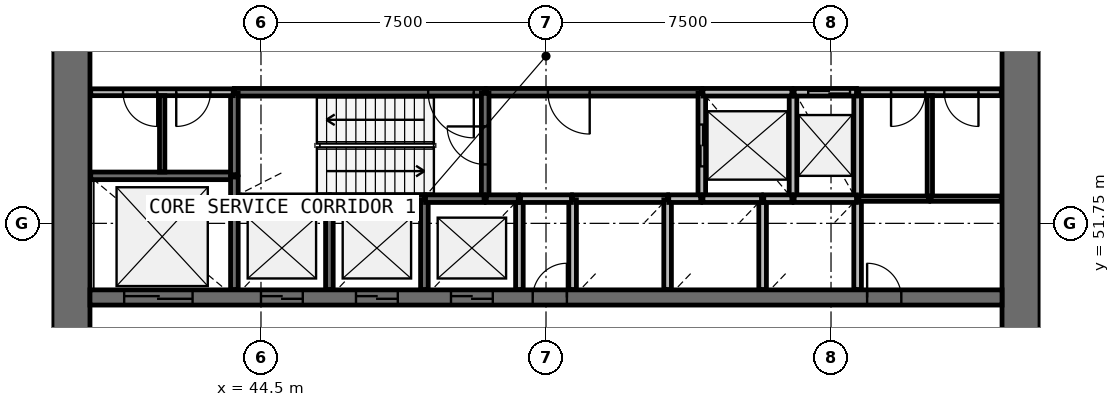
"""IFC4 building model, lengths in metres.
Left out: names, types, materials, properties, quantities, classifications, styles, units other than length and angle.
Written with IfcOpenShell. Run it as: python <this file> out.ifc"""

import sys

from ifc_helpers import new_model, si_unit, direction, frame, frame_2d, origin, place, context, subcontext, project, spatial, rectangle, extrude, source, transform, mapped, element, fill, save


model = new_model("IFC4")
c1 = context("Model", 3, precision=1e-05, world=origin(), true_north=direction((0.0, 1.0)))
c2 = subcontext(c1, "Body", "Model", "MODEL_VIEW")
j1 = project(units=[si_unit("LENGTHUNIT", "METRE"), si_unit("PLANEANGLEUNIT", "RADIAN")], contexts=[c1])
p1 = place(None, origin())
s1 = spatial("IfcSite", under=j1, at=p1, CompositionType="ELEMENT")
p2 = place(p1, origin())
s2 = spatial("IfcBuilding", under=s1, at=p2, CompositionType="ELEMENT")
p3 = place(p2, frame((0.0, 0.0, 71.0)))
s3 = spatial("IfcBuildingStorey", under=s2, at=p3, CompositionType="ELEMENT", Elevation=71.0)
p4 = place(p3, frame((64.5, 38.0, 0.0), z_axis=(0.0, 0.0, 1.0), x_axis=(0.0, 1.0, 0.0)))
e1 = element("IfcWall", 1, at=p4, inside=s3, PredefinedType="SHEAR", context=c2, shape_type="SweptSolid", body=[
    extrude(rectangle(XDim=20.0, YDim=1.0, at=frame_2d((10.0, 0.0))), origin(), (0.0, 0.0, 1.0), 4.4),
])
p5 = place(p4, frame((9.1, 0.0, 0.0)))
e2 = element("IfcOpeningElement", 2, at=p5, cuts=e1, PredefinedType="OPENING", context=c2, shape_type="SweptSolid", body=[
    extrude(rectangle(XDim=1.8, YDim=2.1, at=frame_2d((0.9, 1.05))), frame((0.0, 0.51, 0.0), z_axis=(0.0, -1.0, 0.0), x_axis=(1.0, 0.0, 0.0)), (0.0, 0.0, 1.0), 1.02),
])
p6 = place(p3, frame((39.5, 58.0, 0.0), z_axis=(0.0, 0.0, 1.0), x_axis=(0.0, -1.0, 0.0)))
e3 = element("IfcWall", 3, at=p6, inside=s3, PredefinedType="SHEAR", context=c2, shape_type="SweptSolid", body=[
    extrude(rectangle(XDim=20.0, YDim=1.0, at=frame_2d((10.0, 0.0))), origin(), (0.0, 0.0, 1.0), 4.4),
])
p7 = place(p6, frame((9.1, 0.0, 0.0)))
e4 = element("IfcOpeningElement", 4, at=p7, cuts=e3, PredefinedType="OPENING", context=c2, shape_type="SweptSolid", body=[
    extrude(rectangle(XDim=1.8, YDim=2.1, at=frame_2d((0.9, 1.05))), frame((0.0, 0.51, 0.0), z_axis=(0.0, -1.0, 0.0), x_axis=(1.0, 0.0, 0.0)), (0.0, 0.0, 1.0), 1.02),
])
p8 = place(p3, frame((40.0, 49.8, 0.0), z_axis=(0.0, 0.0, 1.0), x_axis=(1.0, 0.0, 0.0)))
e5 = element("IfcWall", 5, at=p8, inside=s3, PredefinedType="SHEAR", context=c2, shape_type="SweptSolid", body=[
    extrude(rectangle(XDim=24.0, YDim=0.4, at=frame_2d((12.0, 0.0))), origin(), (0.0, 0.0, 1.0), 4.4),
])
p9 = place(p8, frame((4.5, 0.0, 0.0)))
e6 = element("IfcOpeningElement", 6, at=p9, cuts=e5, PredefinedType="OPENING", context=c2, shape_type="SweptSolid", body=[
    extrude(rectangle(XDim=1.1, YDim=2.1, at=frame_2d((0.55, 1.05))), frame((0.0, 0.21, 0.0), z_axis=(0.0, -1.0, 0.0), x_axis=(1.0, 0.0, 0.0)), (0.0, 0.0, 1.0), 0.42),
])
p10 = place(p8, frame((7.0, 0.0, 0.0)))
e7 = element("IfcOpeningElement", 7, at=p10, cuts=e5, PredefinedType="OPENING", context=c2, shape_type="SweptSolid", body=[
    extrude(rectangle(XDim=1.1, YDim=2.1, at=frame_2d((0.55, 1.05))), frame((0.0, 0.21, 0.0), z_axis=(0.0, -1.0, 0.0), x_axis=(1.0, 0.0, 0.0)), (0.0, 0.0, 1.0), 0.42),
])
p11 = place(p8, frame((9.5, 0.0, 0.0)))
e8 = element("IfcOpeningElement", 8, at=p11, cuts=e5, PredefinedType="OPENING", context=c2, shape_type="SweptSolid", body=[
    extrude(rectangle(XDim=1.1, YDim=2.1, at=frame_2d((0.55, 1.05))), frame((0.0, 0.21, 0.0), z_axis=(0.0, -1.0, 0.0), x_axis=(1.0, 0.0, 0.0)), (0.0, 0.0, 1.0), 0.42),
])
p12 = place(p8, frame((0.9, 0.0, 0.0)))
e9 = element("IfcOpeningElement", 9, at=p12, cuts=e5, PredefinedType="OPENING", context=c2, shape_type="SweptSolid", body=[
    extrude(rectangle(XDim=1.8, YDim=2.4, at=frame_2d((0.9, 1.2))), frame((0.0, 0.21, 0.0), z_axis=(0.0, -1.0, 0.0), x_axis=(1.0, 0.0, 0.0)), (0.0, 0.0, 1.0), 0.42),
])
p13 = place(p8, frame((20.45, 0.0, 0.0)))
e10 = element("IfcOpeningElement", 10, at=p13, cuts=e5, PredefinedType="OPENING", context=c2, shape_type="SweptSolid", body=[
    extrude(rectangle(XDim=0.9, YDim=2.1, at=frame_2d((0.45, 1.05))), frame((0.0, 0.21, 0.0), z_axis=(0.0, -1.0, 0.0), x_axis=(1.0, 0.0, 0.0)), (0.0, 0.0, 1.0), 0.42),
])
p14 = place(p8, frame((11.65, 0.0, 0.0)))
e11 = element("IfcOpeningElement", 11, at=p14, cuts=e5, PredefinedType="OPENING", context=c2, shape_type="SweptSolid", body=[
    extrude(rectangle(XDim=0.9, YDim=2.1, at=frame_2d((0.45, 1.05))), frame((0.0, 0.21, 0.0), z_axis=(0.0, -1.0, 0.0), x_axis=(1.0, 0.0, 0.0)), (0.0, 0.0, 1.0), 0.42),
])
p15 = place(p3, frame((50.4, 55.2, 0.0), z_axis=(0.0, 0.0, 1.0), x_axis=(-1.0, 0.0, 0.0)))
e12 = element("IfcWall", 12, at=p15, inside=s3, PredefinedType="SOLIDWALL", context=c2, shape_type="SweptSolid", body=[
    extrude(rectangle(XDim=6.6, YDim=0.2, at=frame_2d((3.3, 0.0))), origin(), (0.0, 0.0, 1.0), 3.9),
])
p16 = place(p15, frame((0.3, 0.0, 0.0)))
e13 = element("IfcOpeningElement", 13, at=p16, cuts=e12, PredefinedType="OPENING", context=c2, shape_type="SweptSolid", body=[
    extrude(rectangle(XDim=1.2, YDim=2.1, at=frame_2d((0.6, 1.05))), frame((0.0, 0.11, 0.0), z_axis=(0.0, -1.0, 0.0), x_axis=(1.0, 0.0, 0.0)), (0.0, 0.0, 1.0), 0.22),
])
p17 = place(p3, frame((56.1, 55.2, 0.0), z_axis=(0.0, 0.0, 1.0), x_axis=(-1.0, 0.0, 0.0)))
e14 = element("IfcWall", 14, at=p17, inside=s3, PredefinedType="SOLIDWALL", context=c2, shape_type="SweptSolid", body=[
    extrude(rectangle(XDim=5.67, YDim=0.2, at=frame_2d((2.835, 0.0))), origin(), (0.0, 0.0, 1.0), 3.9),
])
p18 = place(p17, frame((2.95, 0.0, 0.0)))
e15 = element("IfcOpeningElement", 15, at=p18, cuts=e14, PredefinedType="OPENING", context=c2, shape_type="SweptSolid", body=[
    extrude(rectangle(XDim=1.1, YDim=2.1, at=frame_2d((0.55, 1.05))), frame((0.0, 0.11, 0.0), z_axis=(0.0, -1.0, 0.0), x_axis=(1.0, 0.0, 0.0)), (0.0, 0.0, 1.0), 0.22),
])
p19 = place(p3, frame((43.8, 53.0, 0.0), z_axis=(0.0, 0.0, 1.0), x_axis=(-1.0, 0.0, 0.0)))
e16 = element("IfcWall", 16, at=p19, inside=s3, PredefinedType="SOLIDWALL", context=c2, shape_type="SweptSolid", body=[
    extrude(rectangle(XDim=3.78, YDim=0.2, at=frame_2d((1.89, 0.0))), origin(), (0.0, 0.0, 1.0), 3.9),
])
p20 = place(p3, frame((50.4, 52.4, 0.0), z_axis=(0.0, 0.0, 1.0), x_axis=(0.0, 1.0, 0.0)))
e17 = element("IfcWall", 17, at=p20, inside=s3, PredefinedType="SOLIDWALL", context=c2, shape_type="SweptSolid", body=[
    extrude(rectangle(XDim=2.77, YDim=0.2, at=frame_2d((1.385, 0.0))), origin(), (0.0, 0.0, 1.0), 3.9),
])
p21 = place(p20, frame((0.9, 0.0, 0.0)))
e18 = element("IfcOpeningElement", 18, at=p21, cuts=e17, PredefinedType="OPENING", context=c2, shape_type="SweptSolid", body=[
    extrude(rectangle(XDim=1.0, YDim=2.1, at=frame_2d((0.5, 1.05))), frame((0.0, 0.11, 0.0), z_axis=(0.0, -1.0, 0.0), x_axis=(1.0, 0.0, 0.0)), (0.0, 0.0, 1.0), 0.22),
])
p22 = place(p3, frame((56.1, 55.17, 0.0), z_axis=(0.0, 0.0, 1.0), x_axis=(0.0, -1.0, 0.0)))
e19 = element("IfcWall", 19, at=p22, inside=s3, PredefinedType="SOLIDWALL", context=c2, shape_type="SweptSolid", body=[
    extrude(rectangle(XDim=2.77, YDim=0.2, at=frame_2d((1.385, 0.0))), origin(), (0.0, 0.0, 1.0), 3.9),
])
p23 = place(p22, frame((0.82, 0.0, 0.0)))
e20 = element("IfcOpeningElement", 20, at=p23, cuts=e19, PredefinedType="OPENING", context=c2, shape_type="SweptSolid", body=[
    extrude(rectangle(XDim=1.1, YDim=2.1, at=frame_2d((0.55, 1.05))), frame((0.0, 0.11, 0.0), z_axis=(0.0, -1.0, 0.0), x_axis=(1.0, 0.0, 0.0)), (0.0, 0.0, 1.0), 0.22),
])
for number, where, z_axis, x_axis in (
    (21, (58.5, 52.4, 0.0), (0.0, 0.0, 1.0), (0.0, 1.0, 0.0)),
    (22, (60.2, 52.4, 0.0), (0.0, 0.0, 1.0), (0.0, 1.0, 0.0)),
):
    element("IfcWall", number, at=place(p3, frame(where, z_axis=z_axis, x_axis=x_axis)), inside=s3, PredefinedType="SOLIDWALL", context=c2, shape_type="SweptSolid", body=[
        extrude(rectangle(XDim=2.8, YDim=0.2, at=frame_2d((1.4, 0.0))), origin(), (0.0, 0.0, 1.0), 3.9),
    ])
p24 = place(p3, frame((46.3, 52.4, 0.0), z_axis=(0.0, 0.0, 1.0), x_axis=(-1.0, 0.0, 0.0)))
e23 = element("IfcWall", 23, at=p24, inside=s3, PredefinedType="SOLIDWALL", context=c2, shape_type="SweptSolid", body=[
    extrude(rectangle(XDim=2.5, YDim=0.2, at=frame_2d((1.25, 0.0))), origin(), (0.0, 0.0, 1.0), 3.9),
])
p25 = place(p3, frame((48.8, 52.4, 0.0), z_axis=(0.0, 0.0, 1.0), x_axis=(-1.0, 0.0, 0.0)))
e24 = element("IfcWall", 24, at=p25, inside=s3, PredefinedType="SOLIDWALL", context=c2, shape_type="SweptSolid", body=[
    extrude(rectangle(XDim=2.47, YDim=0.2, at=frame_2d((1.235, 0.0))), origin(), (0.0, 0.0, 1.0), 3.9),
])
p26 = place(p3, frame((55.2, 52.4, 0.0), z_axis=(0.0, 0.0, 1.0), x_axis=(-1.0, 0.0, 0.0)))
e25 = element("IfcWall", 25, at=p26, inside=s3, PredefinedType="SOLIDWALL", context=c2, shape_type="SweptSolid", body=[
    extrude(rectangle(XDim=2.5, YDim=0.2, at=frame_2d((1.25, 0.0))), origin(), (0.0, 0.0, 1.0), 3.9),
])
p27 = place(p3, frame((58.47, 55.2, 0.0), z_axis=(0.0, 0.0, 1.0), x_axis=(-1.0, 0.0, 0.0)))
e26 = element("IfcWall", 26, at=p27, inside=s3, PredefinedType="SOLIDWALL", context=c2, shape_type="SweptSolid", body=[
    extrude(rectangle(XDim=2.34, YDim=0.2, at=frame_2d((1.17, 0.0))), origin(), (0.0, 0.0, 1.0), 3.9),
])
for number, where, z_axis, x_axis in (
    (27, (43.8, 52.37, 0.0), (0.0, 0.0, 1.0), (0.0, -1.0, 0.0)),
    (28, (46.3, 50.01, 0.0), (0.0, 0.0, 1.0), (0.0, 1.0, 0.0)),
    (29, (48.8, 50.01, 0.0), (0.0, 0.0, 1.0), (0.0, 1.0, 0.0)),
):
    element("IfcWall", number, at=place(p3, frame(where, z_axis=z_axis, x_axis=x_axis)), inside=s3, PredefinedType="SOLIDWALL", context=c2, shape_type="SweptSolid", body=[
        extrude(rectangle(XDim=2.36, YDim=0.2, at=frame_2d((1.18, 0.0))), origin(), (0.0, 0.0, 1.0), 3.9),
    ])
p28 = place(p3, frame((51.3, 50.01, 0.0), z_axis=(0.0, 0.0, 1.0), x_axis=(0.0, 1.0, 0.0)))
e30 = element("IfcWall", 30, at=p28, inside=s3, PredefinedType="SOLIDWALL", context=c2, shape_type="SweptSolid", body=[
    extrude(rectangle(XDim=2.39, YDim=0.2, at=frame_2d((1.195, 0.0))), origin(), (0.0, 0.0, 1.0), 3.9),
])
for number, where, z_axis, x_axis in (
    (31, (52.7, 52.37, 0.0), (0.0, 0.0, 1.0), (0.0, -1.0, 0.0)),
    (32, (55.2, 50.01, 0.0), (0.0, 0.0, 1.0), (0.0, 1.0, 0.0)),
):
    element("IfcWall", number, at=place(p3, frame(where, z_axis=z_axis, x_axis=x_axis)), inside=s3, PredefinedType="SOLIDWALL", context=c2, shape_type="SweptSolid", body=[
        extrude(rectangle(XDim=2.36, YDim=0.2, at=frame_2d((1.18, 0.0))), origin(), (0.0, 0.0, 1.0), 3.9),
    ])
p29 = place(p3, frame((57.7, 50.01, 0.0), z_axis=(0.0, 0.0, 1.0), x_axis=(0.0, 1.0, 0.0)))
e33 = element("IfcWall", 33, at=p29, inside=s3, PredefinedType="SOLIDWALL", context=c2, shape_type="SweptSolid", body=[
    extrude(rectangle(XDim=2.39, YDim=0.2, at=frame_2d((1.195, 0.0))), origin(), (0.0, 0.0, 1.0), 3.9),
])
p30 = place(p3, frame((60.2, 50.01, 0.0), z_axis=(0.0, 0.0, 1.0), x_axis=(0.0, 1.0, 0.0)))
e34 = element("IfcWall", 34, at=p30, inside=s3, PredefinedType="SOLIDWALL", context=c2, shape_type="SweptSolid", body=[
    extrude(rectangle(XDim=2.36, YDim=0.2, at=frame_2d((1.18, 0.0))), origin(), (0.0, 0.0, 1.0), 3.9),
])
p31 = place(p3, frame((43.8, 55.17, 0.0), z_axis=(0.0, 0.0, 1.0), x_axis=(0.0, -1.0, 0.0)))
e35 = element("IfcWall", 35, at=p31, inside=s3, PredefinedType="SOLIDWALL", context=c2, shape_type="SweptSolid", body=[
    extrude(rectangle(XDim=2.14, YDim=0.2, at=frame_2d((1.07, 0.0))), origin(), (0.0, 0.0, 1.0), 3.9),
])
p32 = place(p3, frame((60.17, 52.4, 0.0), z_axis=(0.0, 0.0, 1.0), x_axis=(-1.0, 0.0, 0.0)))
e36 = element("IfcWall", 36, at=p32, inside=s3, PredefinedType="SOLIDWALL", context=c2, shape_type="SweptSolid", body=[
    extrude(rectangle(XDim=1.64, YDim=0.2, at=frame_2d((0.82, 0.0))), origin(), (0.0, 0.0, 1.0), 3.9),
])
p33 = place(p3, frame((60.17, 55.2, 0.0), z_axis=(0.0, 0.0, 1.0), x_axis=(-1.0, 0.0, 0.0)))
e37 = element("IfcWall", 37, at=p33, inside=s3, PredefinedType="SOLIDWALL", context=c2, shape_type="SweptSolid", body=[
    extrude(rectangle(XDim=1.64, YDim=0.2, at=frame_2d((0.82, 0.0))), origin(), (0.0, 0.0, 1.0), 3.9),
])
p34 = place(p33, frame((0.17, 0.0, 0.0)))
e38 = element("IfcOpeningElement", 38, at=p34, cuts=e37, PredefinedType="OPENING", context=c2, shape_type="SweptSolid", body=[
    extrude(rectangle(XDim=1.1, YDim=2.1, at=frame_2d((0.55, 1.05))), frame((0.0, 0.11, 0.0), z_axis=(0.0, -1.0, 0.0), x_axis=(1.0, 0.0, 0.0)), (0.0, 0.0, 1.0), 0.22),
])
for number, where, z_axis, x_axis in (
    (39, (50.37, 52.4, 0.0), (0.0, 0.0, 1.0), (-1.0, 0.0, 0.0)),
    (40, (57.67, 52.4, 0.0), (0.0, 0.0, 1.0), (-1.0, 0.0, 0.0)),
):
    element("IfcWall", number, at=place(p3, frame(where, z_axis=z_axis, x_axis=x_axis)), inside=s3, PredefinedType="SOLIDWALL", context=c2, shape_type="SweptSolid", body=[
        extrude(rectangle(XDim=1.54, YDim=0.2, at=frame_2d((0.77, 0.0))), origin(), (0.0, 0.0, 1.0), 3.9),
    ])
p35 = place(p3, frame((51.33, 52.4, 0.0), z_axis=(0.0, 0.0, 1.0), x_axis=(1.0, 0.0, 0.0)))
e41 = element("IfcWall", 41, at=p35, inside=s3, PredefinedType="SOLIDWALL", context=c2, shape_type="SweptSolid", body=[
    extrude(rectangle(XDim=1.34, YDim=0.2, at=frame_2d((0.67, 0.0))), origin(), (0.0, 0.0, 1.0), 3.9),
])
for number, where, z_axis, x_axis in (
    (42, (51.27, 52.4, 0.0), (0.0, 0.0, 1.0), (-1.0, 0.0, 0.0)),
    (43, (56.07, 52.4, 0.0), (0.0, 0.0, 1.0), (-1.0, 0.0, 0.0)),
):
    element("IfcWall", number, at=place(p3, frame(where, z_axis=z_axis, x_axis=x_axis)), inside=s3, PredefinedType="SOLIDWALL", context=c2, shape_type="SweptSolid", body=[
        extrude(rectangle(XDim=0.84, YDim=0.2, at=frame_2d((0.42, 0.0))), origin(), (0.0, 0.0, 1.0), 3.9),
    ])
p36 = place(p3, frame((58.47, 52.4, 0.0), z_axis=(0.0, 0.0, 1.0), x_axis=(-1.0, 0.0, 0.0)))
e44 = element("IfcWall", 44, at=p36, inside=s3, PredefinedType="SOLIDWALL", context=c2, shape_type="SweptSolid", body=[
    extrude(rectangle(XDim=0.74, YDim=0.2, at=frame_2d((0.37, 0.0))), origin(), (0.0, 0.0, 1.0), 3.9),
])
p37 = place(p3, frame((43.8, 52.43, 0.0), z_axis=(0.0, 0.0, 1.0), x_axis=(0.0, 1.0, 0.0)))
e45 = element("IfcWall", 45, at=p37, inside=s3, PredefinedType="SOLIDWALL", context=c2, shape_type="SweptSolid", body=[
    extrude(rectangle(XDim=0.54, YDim=0.2, at=frame_2d((0.27, 0.0))), origin(), (0.0, 0.0, 1.0), 3.9),
])
p38 = place(p3, frame((43.77, 55.2, 0.0), z_axis=(0.0, 0.0, 1.0), x_axis=(-1.0, 0.0, 0.0)))
e46 = element("IfcWall", 46, at=p38, inside=s3, PredefinedType="PARTITIONING", context=c2, shape_type="SweptSolid", body=[
    extrude(rectangle(XDim=3.75, YDim=0.18, at=frame_2d((1.875, 0.0))), origin(), (0.0, 0.0, 1.0), 3.9),
])
p39 = place(p38, frame((2.0, 0.0, 0.0)))
e47 = element("IfcOpeningElement", 47, at=p39, cuts=e46, PredefinedType="OPENING", context=c2, shape_type="SweptSolid", body=[
    extrude(rectangle(XDim=0.9, YDim=2.1, at=frame_2d((0.45, 1.05))), frame((0.0, 0.1, 0.0), z_axis=(0.0, -1.0, 0.0), x_axis=(1.0, 0.0, 0.0)), (0.0, 0.0, 1.0), 0.2),
])
p40 = place(p38, frame((0.6, 0.0, 0.0)))
e48 = element("IfcOpeningElement", 48, at=p40, cuts=e46, PredefinedType="OPENING", context=c2, shape_type="SweptSolid", body=[
    extrude(rectangle(XDim=0.9, YDim=2.1, at=frame_2d((0.45, 1.05))), frame((0.0, 0.1, 0.0), z_axis=(0.0, -1.0, 0.0), x_axis=(1.0, 0.0, 0.0)), (0.0, 0.0, 1.0), 0.2),
])
p41 = place(p3, frame((63.98, 55.2, 0.0), z_axis=(0.0, 0.0, 1.0), x_axis=(-1.0, 0.0, 0.0)))
e49 = element("IfcWall", 49, at=p41, inside=s3, PredefinedType="PARTITIONING", context=c2, shape_type="SweptSolid", body=[
    extrude(rectangle(XDim=3.75, YDim=0.18, at=frame_2d((1.875, 0.0))), origin(), (0.0, 0.0, 1.0), 3.9),
])
p42 = place(p41, frame((2.0, 0.0, 0.0)))
e50 = element("IfcOpeningElement", 50, at=p42, cuts=e49, PredefinedType="OPENING", context=c2, shape_type="SweptSolid", body=[
    extrude(rectangle(XDim=0.9, YDim=2.1, at=frame_2d((0.45, 1.05))), frame((0.0, 0.1, 0.0), z_axis=(0.0, -1.0, 0.0), x_axis=(1.0, 0.0, 0.0)), (0.0, 0.0, 1.0), 0.2),
])
p43 = place(p41, frame((0.6, 0.0, 0.0)))
e51 = element("IfcOpeningElement", 51, at=p43, cuts=e49, PredefinedType="OPENING", context=c2, shape_type="SweptSolid", body=[
    extrude(rectangle(XDim=0.9, YDim=2.1, at=frame_2d((0.45, 1.05))), frame((0.0, 0.1, 0.0), z_axis=(0.0, -1.0, 0.0), x_axis=(1.0, 0.0, 0.0)), (0.0, 0.0, 1.0), 0.2),
])
p44 = place(p3, frame((62.1, 52.4, 0.0), z_axis=(0.0, 0.0, 1.0), x_axis=(0.0, 1.0, 0.0)))
e52 = element("IfcWall", 52, at=p44, inside=s3, PredefinedType="PARTITIONING", context=c2, shape_type="SweptSolid", body=[
    extrude(rectangle(XDim=2.71, YDim=0.14, at=frame_2d((1.355, 0.0))), origin(), (0.0, 0.0, 1.0), 3.0),
])
p45 = place(p3, frame((41.9, 53.1, 0.0), z_axis=(0.0, 0.0, 1.0), x_axis=(0.0, 1.0, 0.0)))
e53 = element("IfcWall", 53, at=p45, inside=s3, PredefinedType="PARTITIONING", context=c2, shape_type="SweptSolid", body=[
    extrude(rectangle(XDim=2.01, YDim=0.14, at=frame_2d((1.005, 0.0))), origin(), (0.0, 0.0, 1.0), 3.0),
])
p46 = place(p3, frame((62.07, 52.4, 0.0), z_axis=(0.0, 0.0, 1.0), x_axis=(-1.0, 0.0, 0.0)))
e54 = element("IfcWall", 54, at=p46, inside=s3, PredefinedType="PARTITIONING", context=c2, shape_type="SweptSolid", body=[
    extrude(rectangle(XDim=1.84, YDim=0.14, at=frame_2d((0.92, 0.0))), origin(), (0.0, 0.0, 1.0), 3.0),
])
p47 = place(p3, frame((63.98, 52.4, 0.0), z_axis=(0.0, 0.0, 1.0), x_axis=(-1.0, 0.0, 0.0)))
e55 = element("IfcWall", 55, at=p47, inside=s3, PredefinedType="PARTITIONING", context=c2, shape_type="SweptSolid", body=[
    extrude(rectangle(XDim=1.85, YDim=0.14, at=frame_2d((0.925, 0.0))), origin(), (0.0, 0.0, 1.0), 3.0),
])
m1 = source(origin(), c2, "Body", "SweptSolid", [
    extrude(rectangle(XDim=1.1, YDim=2.1, at=frame_2d((0.55, 1.05))), frame((0.0, 0.025, 0.0), z_axis=(0.0, -1.0, 0.0), x_axis=(1.0, 0.0, 0.0)), (0.0, 0.0, 1.0), 0.05),
])
p48 = place(p9, origin())
e56 = element("IfcDoor", 56, at=p48, inside=s3, OperationType="DOUBLE_DOOR_SLIDING", PredefinedType="USERDEFINED", context=c2, shape_type="MappedRepresentation", body=[
    mapped(m1, transform((0.0, 0.0, 0.0), scale=1.0)),
])
fill(e6, e56)
p49 = place(p10, origin())
e57 = element("IfcDoor", 57, at=p49, inside=s3, OperationType="DOUBLE_DOOR_SLIDING", PredefinedType="USERDEFINED", context=c2, shape_type="MappedRepresentation", body=[
    mapped(m1, transform((0.0, 0.0, 0.0), scale=1.0)),
])
fill(e7, e57)
p50 = place(p11, origin())
e58 = element("IfcDoor", 58, at=p50, inside=s3, OperationType="DOUBLE_DOOR_SLIDING", PredefinedType="USERDEFINED", context=c2, shape_type="MappedRepresentation", body=[
    mapped(m1, transform((0.0, 0.0, 0.0), scale=1.0)),
])
fill(e8, e58)
p51 = place(p23, origin())
e59 = element("IfcDoor", 59, at=p51, inside=s3, OperationType="DOUBLE_DOOR_SLIDING", PredefinedType="USERDEFINED", context=c2, shape_type="MappedRepresentation", body=[
    mapped(m1, transform((0.0, 0.0, 0.0), scale=1.0)),
])
fill(e20, e59)
p52 = place(p34, origin())
e60 = element("IfcDoor", 60, at=p52, inside=s3, OperationType="DOUBLE_DOOR_SLIDING", PredefinedType="USERDEFINED", context=c2, shape_type="MappedRepresentation", body=[
    mapped(m1, transform((0.0, 0.0, 0.0), scale=1.0)),
])
fill(e38, e60)
m2 = source(origin(), c2, "Body", "SweptSolid", [
    extrude(rectangle(XDim=1.8, YDim=2.4, at=frame_2d((0.9, 1.2))), frame((0.0, 0.025, 0.0), z_axis=(0.0, -1.0, 0.0), x_axis=(1.0, 0.0, 0.0)), (0.0, 0.0, 1.0), 0.05),
])
p53 = place(p12, origin())
e61 = element("IfcDoor", 61, at=p53, inside=s3, OperationType="DOUBLE_DOOR_SLIDING", PredefinedType="USERDEFINED", context=c2, shape_type="MappedRepresentation", body=[
    mapped(m2, transform((0.0, 0.0, 0.0), scale=1.0)),
])
fill(e9, e61)
m3 = source(origin(), c2, "Body", "SweptSolid", [
    extrude(rectangle(XDim=1.2, YDim=2.1, at=frame_2d((0.6, 1.05))), frame((0.0, 0.025, 0.0), z_axis=(0.0, -1.0, 0.0), x_axis=(1.0, 0.0, 0.0)), (0.0, 0.0, 1.0), 0.05),
])
p54 = place(p16, origin())
e62 = element("IfcDoor", 62, at=p54, inside=s3, OperationType="SINGLE_SWING_LEFT", PredefinedType="DOOR", context=c2, shape_type="MappedRepresentation", body=[
    mapped(m3, transform((0.0, 0.0, 0.0), scale=1.0)),
])
fill(e13, e62)
m4 = source(origin(), c2, "Body", "SweptSolid", [
    extrude(rectangle(XDim=1.0, YDim=2.1, at=frame_2d((0.5, 1.05))), frame((0.0, 0.025, 0.0), z_axis=(0.0, -1.0, 0.0), x_axis=(1.0, 0.0, 0.0)), (0.0, 0.0, 1.0), 0.05),
])
p55 = place(p21, origin())
e63 = element("IfcDoor", 63, at=p55, inside=s3, OperationType="SINGLE_SWING_RIGHT", PredefinedType="DOOR", context=c2, shape_type="MappedRepresentation", body=[
    mapped(m4, transform((0.0, 0.0, 0.0), scale=1.0)),
])
fill(e18, e63)
m5 = source(origin(), c2, "Body", "SweptSolid", [
    extrude(rectangle(XDim=1.1, YDim=2.1, at=frame_2d((0.55, 1.05))), frame((0.0, 0.025, 0.0), z_axis=(0.0, -1.0, 0.0), x_axis=(1.0, 0.0, 0.0)), (0.0, 0.0, 1.0), 0.05),
])
p56 = place(p18, origin())
e64 = element("IfcDoor", 64, at=p56, inside=s3, OperationType="SINGLE_SWING_LEFT", PredefinedType="DOOR", context=c2, shape_type="MappedRepresentation", body=[
    mapped(m5, transform((0.0, 0.0, 0.0), scale=1.0)),
])
fill(e15, e64)
m6 = source(origin(), c2, "Body", "SweptSolid", [
    extrude(rectangle(XDim=0.9, YDim=2.1, at=frame_2d((0.45, 1.05))), frame((0.0, 0.025, 0.0), z_axis=(0.0, -1.0, 0.0), x_axis=(1.0, 0.0, 0.0)), (0.0, 0.0, 1.0), 0.05),
])
p57 = place(p39, origin())
e65 = element("IfcDoor", 65, at=p57, inside=s3, OperationType="SINGLE_SWING_LEFT", PredefinedType="DOOR", context=c2, shape_type="MappedRepresentation", body=[
    mapped(m6, transform((0.0, 0.0, 0.0), scale=1.0)),
])
fill(e47, e65)
p58 = place(p40, origin())
e66 = element("IfcDoor", 66, at=p58, inside=s3, OperationType="SINGLE_SWING_RIGHT", PredefinedType="DOOR", context=c2, shape_type="MappedRepresentation", body=[
    mapped(m6, transform((0.0, 0.0, 0.0), scale=1.0)),
])
fill(e48, e66)
p59 = place(p13, origin())
e67 = element("IfcDoor", 67, at=p59, inside=s3, OperationType="SINGLE_SWING_LEFT", PredefinedType="DOOR", context=c2, shape_type="MappedRepresentation", body=[
    mapped(m6, transform((0.0, 0.0, 0.0), scale=1.0)),
])
fill(e10, e67)
p60 = place(p42, origin())
e68 = element("IfcDoor", 68, at=p60, inside=s3, OperationType="SINGLE_SWING_RIGHT", PredefinedType="DOOR", context=c2, shape_type="MappedRepresentation", body=[
    mapped(m6, transform((0.0, 0.0, 0.0), scale=1.0)),
])
fill(e50, e68)
p61 = place(p43, origin())
e69 = element("IfcDoor", 69, at=p61, inside=s3, OperationType="SINGLE_SWING_LEFT", PredefinedType="DOOR", context=c2, shape_type="MappedRepresentation", body=[
    mapped(m6, transform((0.0, 0.0, 0.0), scale=1.0)),
])
fill(e51, e69)
p62 = place(p14, origin())
e70 = element("IfcDoor", 70, at=p62, inside=s3, OperationType="SINGLE_SWING_RIGHT", PredefinedType="DOOR", context=c2, shape_type="MappedRepresentation", body=[
    mapped(m6, transform((0.0, 0.0, 0.0), scale=1.0)),
])
fill(e11, e70)
save(model, sys.argv[1])
